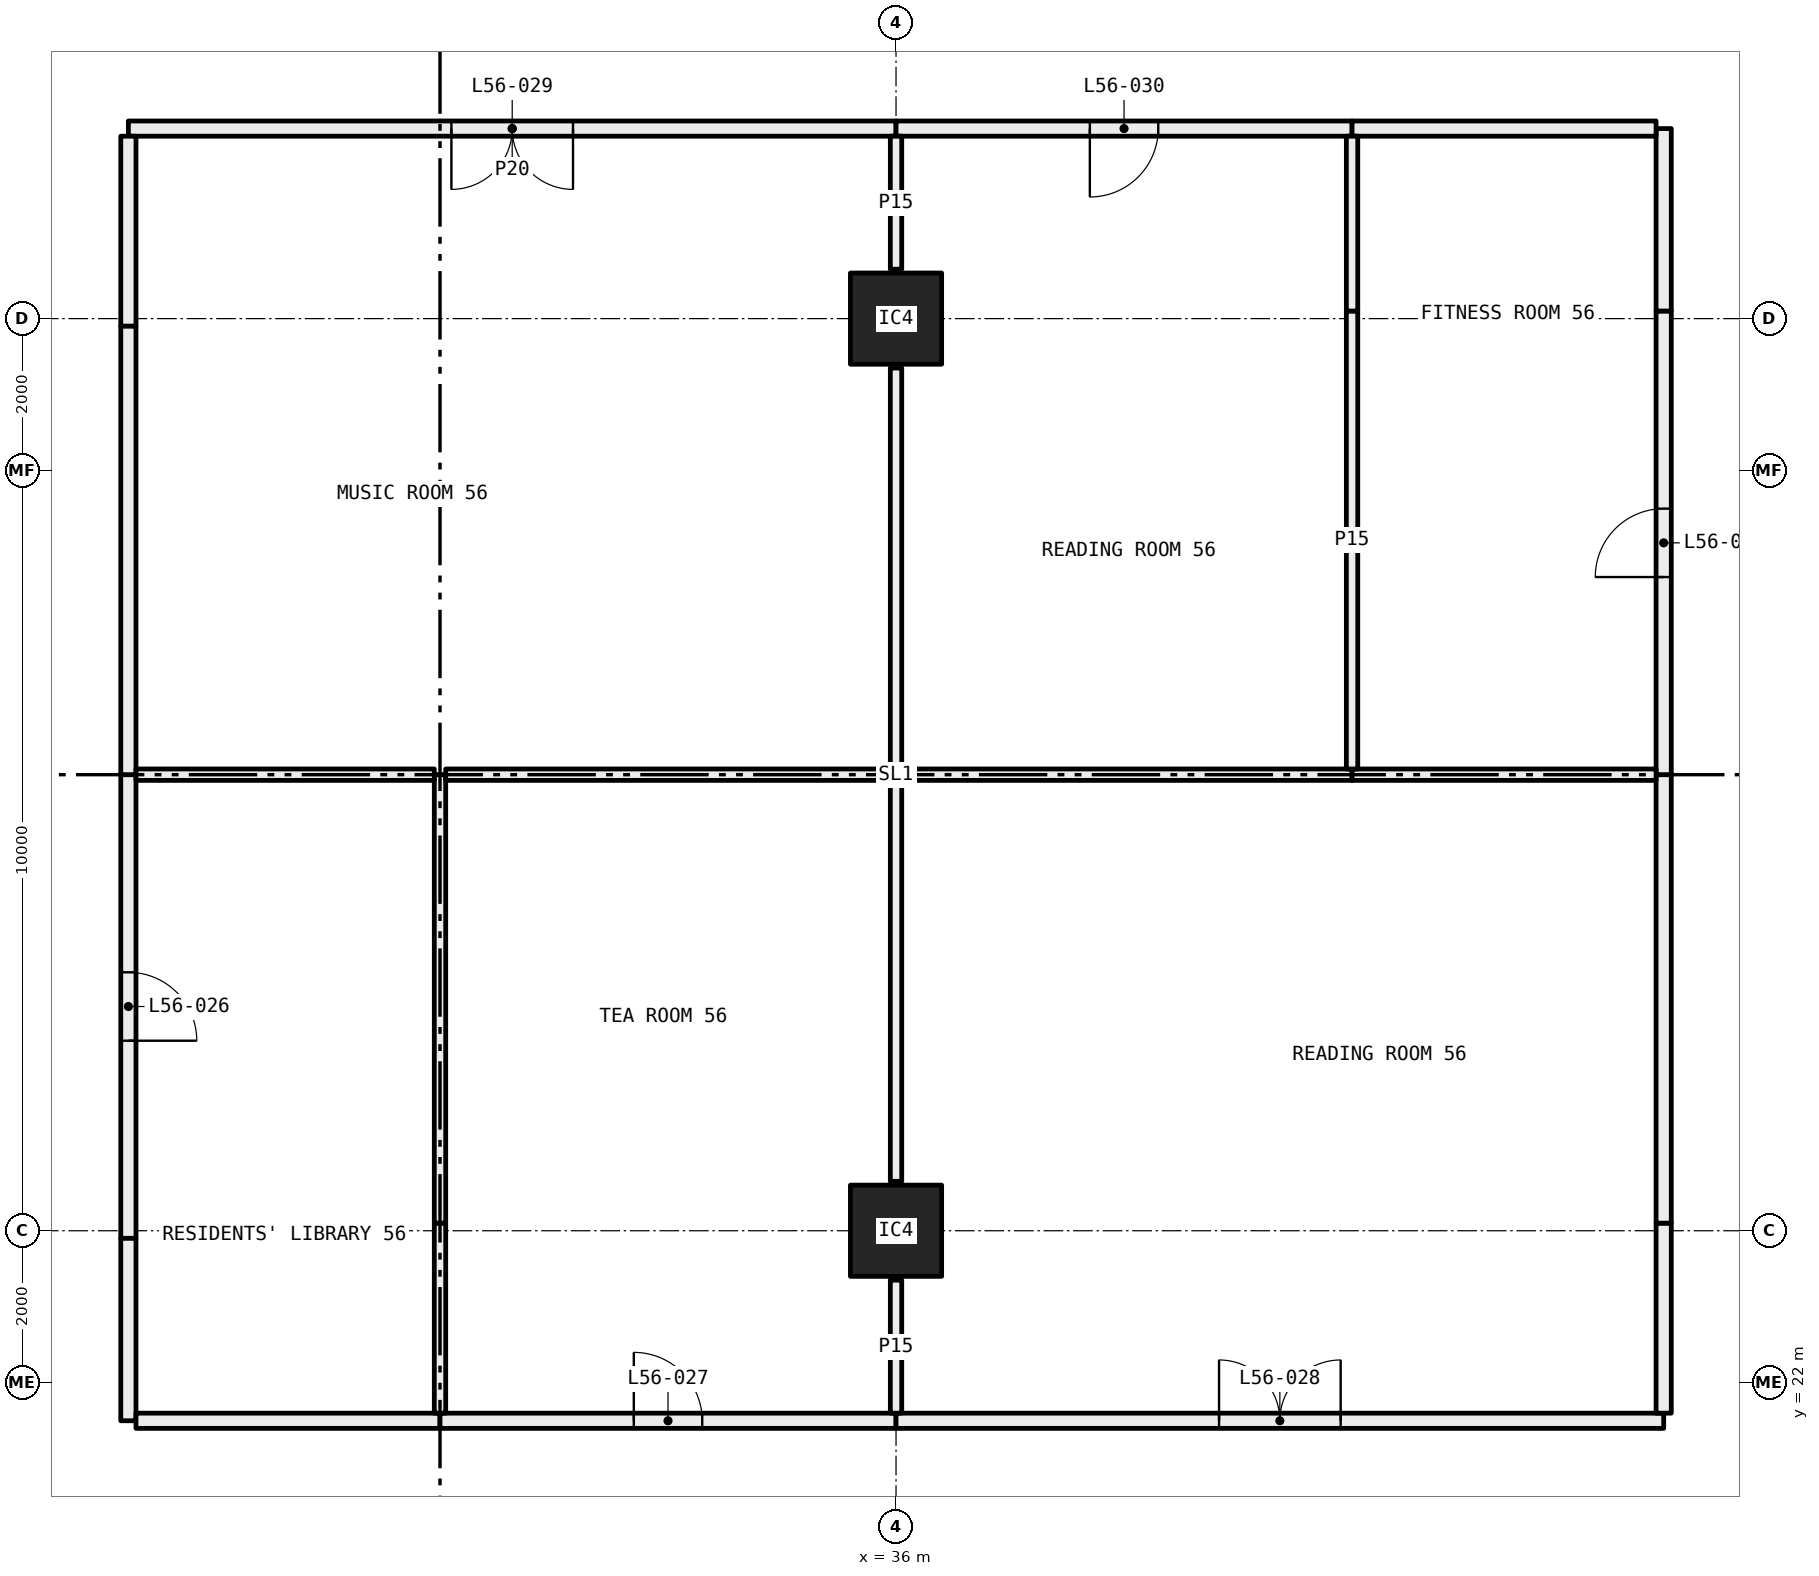
"""IFC4 building model, lengths in metres.
Left out: names, types, materials, properties, quantities, classifications, styles, units other than length and angle.
Written with IfcOpenShell. Run it as: python <this file> out.ifc"""

import sys

from ifc_helpers import new_model, si_unit, direction, frame, frame_2d, origin, origin_2d, place, context, subcontext, project, spatial, rectangle, hollow_rectangle, extrude, element, fill, save


model = new_model("IFC4")
c1 = context("Model", 3, precision=1e-05, world=origin(), true_north=direction((0.0, 1.0)))
c2 = subcontext(c1, "Body", "Model", "MODEL_VIEW")
j1 = project(units=[si_unit("LENGTHUNIT", "METRE"), si_unit("PLANEANGLEUNIT", "RADIAN")], contexts=[c1])
p1 = place(None, origin())
s1 = spatial("IfcSite", under=j1, at=p1, CompositionType="ELEMENT")
p2 = place(p1, origin())
s2 = spatial("IfcBuilding", under=s1, at=p2, CompositionType="ELEMENT")
p3 = place(p2, frame((0.0, 0.0, 210.0)))
s3 = spatial("IfcBuildingStorey", under=s2, at=p3, CompositionType="ELEMENT", Elevation=210.0)
for number, where, z_axis, x_axis in (
    (1, (36.0, 24.0, 0.0), (0.0, 0.0, 1.0), (1.0, 0.0, 0.0)),
    (2, (36.0, 36.0, 0.0), (0.0, 0.0, 1.0), (1.0, 0.0, 0.0)),
):
    element("IfcColumn", number, at=place(p3, frame(where, z_axis=z_axis, x_axis=x_axis)), inside=s3, PredefinedType="COLUMN", context=c2, shape_type="SweptSolid", body=[
        extrude(hollow_rectangle(XDim=1.2, YDim=1.2, WallThickness=0.05, at=origin_2d()), origin(), (0.0, 0.0, 1.0), 3.05),
    ])
p4 = place(p3, frame((25.9, 30.0, 0.0), z_axis=(0.0, 0.0, 1.0), x_axis=(0.0, -1.0, 0.0)))
e3 = element("IfcWall", 3, at=p4, inside=s3, PredefinedType="PARTITIONING", context=c2, shape_type="SweptSolid", body=[
    extrude(rectangle(XDim=6.1, YDim=0.2, at=frame_2d((3.05, 0.0))), origin(), (0.0, 0.0, 1.0), 2.45),
])
p5 = place(p4, frame((2.6, 0.0, 0.0)))
e4 = element("IfcOpeningElement", 4, at=p5, cuts=e3, PredefinedType="OPENING", context=c2, shape_type="SweptSolid", body=[
    extrude(rectangle(XDim=0.9, YDim=2.1, at=frame_2d((0.45, 1.05))), frame((0.0, 0.11, 0.0), z_axis=(0.0, -1.0, 0.0), x_axis=(1.0, 0.0, 0.0)), (0.0, 0.0, 1.0), 0.22),
])
p6 = place(p3, frame((25.9, 23.9, 0.0), z_axis=(0.0, 0.0, 1.0), x_axis=(0.0, -1.0, 0.0)))
e5 = element("IfcWall", 5, at=p6, inside=s3, PredefinedType="PARTITIONING", context=c2, shape_type="SweptSolid", body=[
    extrude(rectangle(XDim=2.4, YDim=0.2, at=frame_2d((1.2, 0.0))), origin(), (0.0, 0.0, 1.0), 3.05),
])
p7 = place(p3, frame((26.0, 21.5, 0.0), z_axis=(0.0, 0.0, 1.0), x_axis=(1.0, 0.0, 0.0)))
e6 = element("IfcWall", 6, at=p7, inside=s3, PredefinedType="PARTITIONING", context=c2, shape_type="SweptSolid", body=[
    extrude(rectangle(XDim=4.0, YDim=0.2, at=frame_2d((2.0, 0.0))), origin(), (0.0, 0.0, 1.0), 3.05),
])
p8 = place(p3, frame((30.0, 21.5, 0.0), z_axis=(0.0, 0.0, 1.0), x_axis=(1.0, 0.0, 0.0)))
e7 = element("IfcWall", 7, at=p8, inside=s3, PredefinedType="PARTITIONING", context=c2, shape_type="SweptSolid", body=[
    extrude(rectangle(XDim=6.0, YDim=0.2, at=frame_2d((3.0, 0.0))), origin(), (0.0, 0.0, 1.0), 2.45),
])
p9 = place(p8, frame((2.55, 0.0, 0.0)))
e8 = element("IfcOpeningElement", 8, at=p9, cuts=e7, PredefinedType="OPENING", context=c2, shape_type="SweptSolid", body=[
    extrude(rectangle(XDim=0.9, YDim=2.1, at=frame_2d((0.45, 1.05))), frame((0.0, 0.11, 0.0), z_axis=(0.0, -1.0, 0.0), x_axis=(1.0, 0.0, 0.0)), (0.0, 0.0, 1.0), 0.22),
])
p10 = place(p3, frame((36.0, 21.5, 0.0), z_axis=(0.0, 0.0, 1.0), x_axis=(1.0, 0.0, 0.0)))
e9 = element("IfcWall", 9, at=p10, inside=s3, PredefinedType="PARTITIONING", context=c2, shape_type="SweptSolid", body=[
    extrude(rectangle(XDim=10.1, YDim=0.2, at=frame_2d((5.05, 0.0))), origin(), (0.0, 0.0, 1.0), 2.45),
])
p11 = place(p10, frame((4.25, 0.0, 0.0)))
e10 = element("IfcOpeningElement", 10, at=p11, cuts=e9, PredefinedType="OPENING", context=c2, shape_type="SweptSolid", body=[
    extrude(rectangle(XDim=1.6, YDim=2.1, at=frame_2d((0.8, 1.05))), frame((0.0, 0.11, 0.0), z_axis=(0.0, -1.0, 0.0), x_axis=(1.0, 0.0, 0.0)), (0.0, 0.0, 1.0), 0.22),
])
p12 = place(p3, frame((46.1, 21.6, 0.0), z_axis=(0.0, 0.0, 1.0), x_axis=(0.0, 1.0, 0.0)))
e11 = element("IfcWall", 11, at=p12, inside=s3, PredefinedType="PARTITIONING", context=c2, shape_type="SweptSolid", body=[
    extrude(rectangle(XDim=2.5, YDim=0.2, at=frame_2d((1.25, 0.0))), origin(), (0.0, 0.0, 1.0), 2.45),
])
p13 = place(p3, frame((46.1, 24.1, 0.0), z_axis=(0.0, 0.0, 1.0), x_axis=(0.0, 1.0, 0.0)))
e12 = element("IfcWall", 12, at=p13, inside=s3, PredefinedType="PARTITIONING", context=c2, shape_type="SweptSolid", body=[
    extrude(rectangle(XDim=5.9, YDim=0.2, at=frame_2d((2.95, 0.0))), origin(), (0.0, 0.0, 1.0), 3.05),
])
p14 = place(p3, frame((36.0, 38.5, 0.0), z_axis=(0.0, 0.0, 1.0), x_axis=(-1.0, 0.0, 0.0)))
e13 = element("IfcWall", 13, at=p14, inside=s3, PredefinedType="PARTITIONING", context=c2, shape_type="SweptSolid", body=[
    extrude(rectangle(XDim=10.1, YDim=0.2, at=frame_2d((5.05, 0.0))), origin(), (0.0, 0.0, 1.0), 2.45),
])
p15 = place(p14, frame((4.25, 0.0, 0.0)))
e14 = element("IfcOpeningElement", 14, at=p15, cuts=e13, PredefinedType="OPENING", context=c2, shape_type="SweptSolid", body=[
    extrude(rectangle(XDim=1.6, YDim=2.1, at=frame_2d((0.8, 1.05))), frame((0.0, 0.11, 0.0), z_axis=(0.0, -1.0, 0.0), x_axis=(1.0, 0.0, 0.0)), (0.0, 0.0, 1.0), 0.22),
])
p16 = place(p3, frame((25.9, 38.4, 0.0), z_axis=(0.0, 0.0, 1.0), x_axis=(0.0, -1.0, 0.0)))
e15 = element("IfcWall", 15, at=p16, inside=s3, PredefinedType="PARTITIONING", context=c2, shape_type="SweptSolid", body=[
    extrude(rectangle(XDim=2.5, YDim=0.2, at=frame_2d((1.25, 0.0))), origin(), (0.0, 0.0, 1.0), 2.45),
])
p17 = place(p3, frame((25.9, 35.9, 0.0), z_axis=(0.0, 0.0, 1.0), x_axis=(0.0, -1.0, 0.0)))
e16 = element("IfcWall", 16, at=p17, inside=s3, PredefinedType="PARTITIONING", context=c2, shape_type="SweptSolid", body=[
    extrude(rectangle(XDim=5.9, YDim=0.2, at=frame_2d((2.95, 0.0))), origin(), (0.0, 0.0, 1.0), 3.05),
])
p18 = place(p3, frame((42.0, 38.5, 0.0), z_axis=(0.0, 0.0, 1.0), x_axis=(-1.0, 0.0, 0.0)))
e17 = element("IfcWall", 17, at=p18, inside=s3, PredefinedType="PARTITIONING", context=c2, shape_type="SweptSolid", body=[
    extrude(rectangle(XDim=6.0, YDim=0.2, at=frame_2d((3.0, 0.0))), origin(), (0.0, 0.0, 1.0), 2.45),
])
p19 = place(p18, frame((2.55, 0.0, 0.0)))
e18 = element("IfcOpeningElement", 18, at=p19, cuts=e17, PredefinedType="OPENING", context=c2, shape_type="SweptSolid", body=[
    extrude(rectangle(XDim=0.9, YDim=2.1, at=frame_2d((0.45, 1.05))), frame((0.0, 0.11, 0.0), z_axis=(0.0, -1.0, 0.0), x_axis=(1.0, 0.0, 0.0)), (0.0, 0.0, 1.0), 0.22),
])
p20 = place(p3, frame((46.1, 30.0, 0.0), z_axis=(0.0, 0.0, 1.0), x_axis=(0.0, 1.0, 0.0)))
e19 = element("IfcWall", 19, at=p20, inside=s3, PredefinedType="PARTITIONING", context=c2, shape_type="SweptSolid", body=[
    extrude(rectangle(XDim=6.1, YDim=0.2, at=frame_2d((3.05, 0.0))), origin(), (0.0, 0.0, 1.0), 2.45),
])
p21 = place(p20, frame((2.6, 0.0, 0.0)))
e20 = element("IfcOpeningElement", 20, at=p21, cuts=e19, PredefinedType="OPENING", context=c2, shape_type="SweptSolid", body=[
    extrude(rectangle(XDim=0.9, YDim=2.1, at=frame_2d((0.45, 1.05))), frame((0.0, 0.11, 0.0), z_axis=(0.0, -1.0, 0.0), x_axis=(1.0, 0.0, 0.0)), (0.0, 0.0, 1.0), 0.22),
])
p22 = place(p3, frame((46.1, 36.1, 0.0), z_axis=(0.0, 0.0, 1.0), x_axis=(0.0, 1.0, 0.0)))
e21 = element("IfcWall", 21, at=p22, inside=s3, PredefinedType="PARTITIONING", context=c2, shape_type="SweptSolid", body=[
    extrude(rectangle(XDim=2.4, YDim=0.2, at=frame_2d((1.2, 0.0))), origin(), (0.0, 0.0, 1.0), 3.05),
])
p23 = place(p3, frame((46.0, 38.5, 0.0), z_axis=(0.0, 0.0, 1.0), x_axis=(-1.0, 0.0, 0.0)))
e22 = element("IfcWall", 22, at=p23, inside=s3, PredefinedType="PARTITIONING", context=c2, shape_type="SweptSolid", body=[
    extrude(rectangle(XDim=4.0, YDim=0.2, at=frame_2d((2.0, 0.0))), origin(), (0.0, 0.0, 1.0), 3.05),
])
p24 = place(p3, frame((30.0, 21.6, 0.0), z_axis=(0.0, 0.0, 1.0), x_axis=(0.0, 1.0, 0.0)))
e23 = element("IfcWall", 23, at=p24, inside=s3, PredefinedType="PARTITIONING", context=c2, shape_type="SweptSolid", body=[
    extrude(rectangle(XDim=2.5, YDim=0.15, at=frame_2d((1.25, 0.0))), origin(), (0.0, 0.0, 1.0), 2.45),
])
p25 = place(p3, frame((30.0, 24.1, 0.0), z_axis=(0.0, 0.0, 1.0), x_axis=(0.0, 1.0, 0.0)))
e24 = element("IfcWall", 24, at=p25, inside=s3, PredefinedType="PARTITIONING", context=c2, shape_type="SweptSolid", body=[
    extrude(rectangle(XDim=5.9, YDim=0.15, at=frame_2d((2.95, 0.0))), origin(), (0.0, 0.0, 1.0), 3.05),
])
p26 = place(p3, frame((29.925, 30.0, 0.0), z_axis=(0.0, 0.0, 1.0), x_axis=(-1.0, 0.0, 0.0)))
e25 = element("IfcWall", 25, at=p26, inside=s3, PredefinedType="PARTITIONING", context=c2, shape_type="SweptSolid", body=[
    extrude(rectangle(XDim=3.925, YDim=0.15, at=frame_2d((1.962, 0.0))), origin(), (0.0, 0.0, 1.0), 3.05),
])
p27 = place(p3, frame((36.0, 21.6, 0.0), z_axis=(0.0, 0.0, 1.0), x_axis=(0.0, 1.0, 0.0)))
e26 = element("IfcWall", 26, at=p27, inside=s3, PredefinedType="PARTITIONING", context=c2, shape_type="SweptSolid", body=[
    extrude(rectangle(XDim=1.75, YDim=0.15, at=frame_2d((0.875, 0.0))), origin(), (0.0, 0.0, 1.0), 2.45),
])
p28 = place(p3, frame((36.0, 24.65, 0.0), z_axis=(0.0, 0.0, 1.0), x_axis=(0.0, 1.0, 0.0)))
e27 = element("IfcWall", 27, at=p28, inside=s3, PredefinedType="PARTITIONING", context=c2, shape_type="SweptSolid", body=[
    extrude(rectangle(XDim=5.35, YDim=0.15, at=frame_2d((2.675, 0.0))), origin(), (0.0, 0.0, 1.0), 2.45),
])
p29 = place(p3, frame((35.925, 30.0, 0.0), z_axis=(0.0, 0.0, 1.0), x_axis=(-1.0, 0.0, 0.0)))
e28 = element("IfcWall", 28, at=p29, inside=s3, PredefinedType="PARTITIONING", context=c2, shape_type="SweptSolid", body=[
    extrude(rectangle(XDim=5.85, YDim=0.15, at=frame_2d((2.925, 0.0))), origin(), (0.0, 0.0, 1.0), 2.45),
])
p30 = place(p3, frame((42.0, 30.0, 0.0), z_axis=(0.0, 0.0, 1.0), x_axis=(-1.0, 0.0, 0.0)))
e29 = element("IfcWall", 29, at=p30, inside=s3, PredefinedType="PARTITIONING", context=c2, shape_type="SweptSolid", body=[
    extrude(rectangle(XDim=5.925, YDim=0.15, at=frame_2d((2.962, 0.0))), origin(), (0.0, 0.0, 1.0), 2.45),
])
p31 = place(p3, frame((46.0, 30.0, 0.0), z_axis=(0.0, 0.0, 1.0), x_axis=(-1.0, 0.0, 0.0)))
e30 = element("IfcWall", 30, at=p31, inside=s3, PredefinedType="PARTITIONING", context=c2, shape_type="SweptSolid", body=[
    extrude(rectangle(XDim=4.0, YDim=0.15, at=frame_2d((2.0, 0.0))), origin(), (0.0, 0.0, 1.0), 3.05),
])
p32 = place(p3, frame((36.0, 30.075, 0.0), z_axis=(0.0, 0.0, 1.0), x_axis=(0.0, 1.0, 0.0)))
e31 = element("IfcWall", 31, at=p32, inside=s3, PredefinedType="PARTITIONING", context=c2, shape_type="SweptSolid", body=[
    extrude(rectangle(XDim=5.275, YDim=0.15, at=frame_2d((2.638, 0.0))), origin(), (0.0, 0.0, 1.0), 2.45),
])
p33 = place(p3, frame((36.0, 36.65, 0.0), z_axis=(0.0, 0.0, 1.0), x_axis=(0.0, 1.0, 0.0)))
e32 = element("IfcWall", 32, at=p33, inside=s3, PredefinedType="PARTITIONING", context=c2, shape_type="SweptSolid", body=[
    extrude(rectangle(XDim=1.75, YDim=0.15, at=frame_2d((0.875, 0.0))), origin(), (0.0, 0.0, 1.0), 2.45),
])
p34 = place(p3, frame((42.0, 30.075, 0.0), z_axis=(0.0, 0.0, 1.0), x_axis=(0.0, 1.0, 0.0)))
e33 = element("IfcWall", 33, at=p34, inside=s3, PredefinedType="PARTITIONING", context=c2, shape_type="SweptSolid", body=[
    extrude(rectangle(XDim=6.025, YDim=0.15, at=frame_2d((3.013, 0.0))), origin(), (0.0, 0.0, 1.0), 2.45),
])
p35 = place(p3, frame((42.0, 36.1, 0.0), z_axis=(0.0, 0.0, 1.0), x_axis=(0.0, 1.0, 0.0)))
e34 = element("IfcWall", 34, at=p35, inside=s3, PredefinedType="PARTITIONING", context=c2, shape_type="SweptSolid", body=[
    extrude(rectangle(XDim=2.3, YDim=0.15, at=frame_2d((1.15, 0.0))), origin(), (0.0, 0.0, 1.0), 3.05),
])
p36 = place(p5, origin())
e35 = element("IfcDoor", 35, at=p36, inside=s3, OperationType="SINGLE_SWING_LEFT", PredefinedType="DOOR", context=c2, shape_type="SweptSolid", body=[
    extrude(rectangle(XDim=0.9, YDim=2.1, at=frame_2d((0.45, 1.05))), frame((0.0, 0.025, 0.0), z_axis=(0.0, -1.0, 0.0), x_axis=(1.0, 0.0, 0.0)), (0.0, 0.0, 1.0), 0.05),
])
fill(e4, e35)
p37 = place(p9, origin())
e36 = element("IfcDoor", 36, at=p37, inside=s3, OperationType="SINGLE_SWING_RIGHT", PredefinedType="DOOR", context=c2, shape_type="SweptSolid", body=[
    extrude(rectangle(XDim=0.9, YDim=2.1, at=frame_2d((0.45, 1.05))), frame((0.0, 0.025, 0.0), z_axis=(0.0, -1.0, 0.0), x_axis=(1.0, 0.0, 0.0)), (0.0, 0.0, 1.0), 0.05),
])
fill(e8, e36)
p38 = place(p11, origin())
e37 = element("IfcDoor", 37, at=p38, inside=s3, OperationType="DOUBLE_DOOR_SINGLE_SWING", PredefinedType="DOOR", context=c2, shape_type="SweptSolid", body=[
    extrude(rectangle(XDim=1.6, YDim=2.1, at=frame_2d((0.8, 1.05))), frame((0.0, 0.025, 0.0), z_axis=(0.0, -1.0, 0.0), x_axis=(1.0, 0.0, 0.0)), (0.0, 0.0, 1.0), 0.05),
])
fill(e10, e37)
p39 = place(p15, origin())
e38 = element("IfcDoor", 38, at=p39, inside=s3, OperationType="DOUBLE_DOOR_SINGLE_SWING", PredefinedType="DOOR", context=c2, shape_type="SweptSolid", body=[
    extrude(rectangle(XDim=1.6, YDim=2.1, at=frame_2d((0.8, 1.05))), frame((0.0, 0.025, 0.0), z_axis=(0.0, -1.0, 0.0), x_axis=(1.0, 0.0, 0.0)), (0.0, 0.0, 1.0), 0.05),
])
fill(e14, e38)
p40 = place(p19, origin())
e39 = element("IfcDoor", 39, at=p40, inside=s3, OperationType="SINGLE_SWING_LEFT", PredefinedType="DOOR", context=c2, shape_type="SweptSolid", body=[
    extrude(rectangle(XDim=0.9, YDim=2.1, at=frame_2d((0.45, 1.05))), frame((0.0, 0.025, 0.0), z_axis=(0.0, -1.0, 0.0), x_axis=(1.0, 0.0, 0.0)), (0.0, 0.0, 1.0), 0.05),
])
fill(e18, e39)
p41 = place(p21, origin())
e40 = element("IfcDoor", 40, at=p41, inside=s3, OperationType="SINGLE_SWING_RIGHT", PredefinedType="DOOR", context=c2, shape_type="SweptSolid", body=[
    extrude(rectangle(XDim=0.9, YDim=2.1, at=frame_2d((0.45, 1.05))), frame((0.0, 0.025, 0.0), z_axis=(0.0, -1.0, 0.0), x_axis=(1.0, 0.0, 0.0)), (0.0, 0.0, 1.0), 0.05),
])
fill(e20, e40)
save(model, sys.argv[1])
